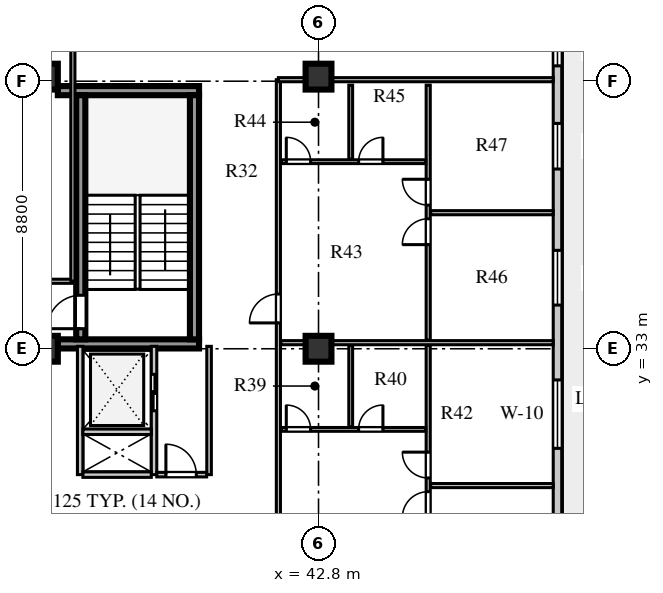
"""IFC4 building model, lengths in metres.
Left out: names, types, materials, properties, quantities, classifications, styles, units other than length and angle.
Written with IfcOpenShell. Run it as: python <this file> out.ifc"""

import sys

from ifc_helpers import new_model, si_unit, direction, frame, frame_2d, origin, origin_2d, place, context, subcontext, project, spatial, rectangle, extrude, element, fill, save


model = new_model("IFC4")
c1 = context("Model", 3, precision=1e-05, world=origin(), true_north=direction((0.0, 1.0)))
c2 = subcontext(c1, "Body", "Model", "MODEL_VIEW")
j1 = project(units=[si_unit("LENGTHUNIT", "METRE"), si_unit("PLANEANGLEUNIT", "RADIAN")], contexts=[c1])
p1 = place(None, origin())
s1 = spatial("IfcSite", under=j1, at=p1, CompositionType="ELEMENT")
p2 = place(p1, origin())
s2 = spatial("IfcBuilding", under=s1, at=p2, CompositionType="ELEMENT")
p3 = place(p2, frame((0.0, 0.0, 229.7)))
s3 = spatial("IfcBuildingStorey", under=s2, at=p3, CompositionType="ELEMENT", Elevation=229.7)
for number, where, z_axis, x_axis in (
    (1, (34.225, 33.16, 0.0), (0.0, 0.0, 1.0), (1.0, 0.0, 0.0)),
    (2, (34.225, 41.49, 0.0), (0.0, 0.0, 1.0), (1.0, 0.0, 0.0)),
):
    element("IfcWall", number, at=place(p3, frame(where, z_axis=z_axis, x_axis=x_axis)), inside=s3, PredefinedType="SHEAR", context=c2, shape_type="SweptSolid", body=[
        extrude(rectangle(XDim=4.645, YDim=0.3, at=frame_2d((2.323, 0.0))), origin(), (0.0, 0.0, 1.0), 3.66),
    ])
p4 = place(p3, frame((34.98, 33.31, 0.0), z_axis=(0.0, 0.0, 1.0), x_axis=(0.0, 1.0, 0.0)))
e3 = element("IfcWall", 3, at=p4, inside=s3, PredefinedType="SHEAR", context=c2, shape_type="SweptSolid", body=[
    extrude(rectangle(XDim=8.03, YDim=0.3, at=frame_2d((4.015, 0.0))), origin(), (0.0, 0.0, 1.0), 3.66),
])
p5 = place(p4, frame((0.35, 0.0, 0.0)))
e4 = element("IfcOpeningElement", 4, at=p5, cuts=e3, PredefinedType="OPENING", context=c2, shape_type="SweptSolid", body=[
    extrude(rectangle(XDim=1.1, YDim=2.1, at=frame_2d((0.55, 1.05))), frame((0.0, 0.16, 0.0), z_axis=(0.0, -1.0, 0.0), x_axis=(1.0, 0.0, 0.0)), (0.0, 0.0, 1.0), 0.32),
])
p6 = place(p3, frame((38.72, 33.31, 0.0), z_axis=(0.0, 0.0, 1.0), x_axis=(0.0, 1.0, 0.0)))
e5 = element("IfcWall", 5, at=p6, inside=s3, PredefinedType="SHEAR", context=c2, shape_type="SweptSolid", body=[
    extrude(rectangle(XDim=8.03, YDim=0.3, at=frame_2d((4.015, 0.0))), origin(), (0.0, 0.0, 1.0), 3.66),
])
for number, where, z_axis, x_axis in (
    (6, (33.8, 33.0, 0.0), (0.0, 0.0, 1.0), (1.0, 0.0, 0.0)),
    (7, (33.8, 41.95, 0.0), (0.0, 0.0, 1.0), (1.0, 0.0, 0.0)),
    (8, (42.8, 33.0, 0.0), (0.0, 0.0, 1.0), (1.0, 0.0, 0.0)),
    (9, (42.8, 41.95, 0.0), (0.0, 0.0, 1.0), (1.0, 0.0, 0.0)),
):
    element("IfcColumn", number, at=place(p3, frame(where, z_axis=z_axis, x_axis=x_axis)), inside=s3, PredefinedType="COLUMN", context=c2, shape_type="SweptSolid", body=[
        extrude(rectangle(XDim=0.85, YDim=0.85, at=origin_2d()), origin(), (0.0, 0.0, 1.0), 3.66),
    ])
p7 = place(p3, frame((50.66, 13.13, 0.0), z_axis=(0.0, 0.0, 1.0), x_axis=(0.0, 1.0, 0.0)))
e10 = element("IfcWall", 10, at=p7, inside=s3, PredefinedType="STANDARD", context=c2, shape_type="SweptSolid", body=[
    extrude(rectangle(XDim=30.94, YDim=0.28, at=frame_2d((15.47, 0.0))), origin(), (0.0, 0.0, 1.0), 3.66),
])
p8 = place(p7, frame((0.67, 0.0, 0.0)))
e11 = element("IfcOpeningElement", 11, at=p8, cuts=e10, PredefinedType="OPENING", context=c2, shape_type="SweptSolid", body=[
    extrude(rectangle(XDim=1.0, YDim=2.05, at=frame_2d((0.5, 1.025))), frame((0.0, 0.15, 0.0), z_axis=(0.0, -1.0, 0.0), x_axis=(1.0, 0.0, 0.0)), (0.0, 0.0, 1.0), 0.3),
])
p9 = place(p7, frame((3.683, 0.0, 0.8)))
e12 = element("IfcOpeningElement", 12, at=p9, cuts=e10, PredefinedType="OPENING", context=c2, shape_type="SweptSolid", body=[
    extrude(rectangle(XDim=1.35, YDim=1.9, at=frame_2d((0.675, 0.95))), frame((0.0, 0.15, 0.0), z_axis=(0.0, -1.0, 0.0), x_axis=(1.0, 0.0, 0.0)), (0.0, 0.0, 1.0), 0.3),
])
p10 = place(p7, frame((7.757, 0.0, 0.8)))
e13 = element("IfcOpeningElement", 13, at=p10, cuts=e10, PredefinedType="OPENING", context=c2, shape_type="SweptSolid", body=[
    extrude(rectangle(XDim=1.65, YDim=1.95, at=frame_2d((0.825, 0.975))), frame((0.0, 0.15, 0.0), z_axis=(0.0, -1.0, 0.0), x_axis=(1.0, 0.0, 0.0)), (0.0, 0.0, 1.0), 0.3),
])
p11 = place(p7, frame((12.045, 0.0, 0.8)))
e14 = element("IfcOpeningElement", 14, at=p11, cuts=e10, PredefinedType="OPENING", context=c2, shape_type="SweptSolid", body=[
    extrude(rectangle(XDim=1.95, YDim=2.0, at=frame_2d((0.975, 1.0))), frame((0.0, 0.15, 0.0), z_axis=(0.0, -1.0, 0.0), x_axis=(1.0, 0.0, 0.0)), (0.0, 0.0, 1.0), 0.3),
])
p12 = place(p7, frame((16.595, 0.0, 0.8)))
e15 = element("IfcOpeningElement", 15, at=p12, cuts=e10, PredefinedType="OPENING", context=c2, shape_type="SweptSolid", body=[
    extrude(rectangle(XDim=2.25, YDim=2.0, at=frame_2d((1.125, 1.0))), frame((0.0, 0.15, 0.0), z_axis=(0.0, -1.0, 0.0), x_axis=(1.0, 0.0, 0.0)), (0.0, 0.0, 1.0), 0.3),
])
p13 = place(p7, frame((21.307, 0.0, 0.8)))
e16 = element("IfcOpeningElement", 16, at=p13, cuts=e10, PredefinedType="OPENING", context=c2, shape_type="SweptSolid", body=[
    extrude(rectangle(XDim=1.8, YDim=2.0, at=frame_2d((0.9, 1.0))), frame((0.0, 0.15, 0.0), z_axis=(0.0, -1.0, 0.0), x_axis=(1.0, 0.0, 0.0)), (0.0, 0.0, 1.0), 0.3),
])
p14 = place(p7, frame((25.782, 0.0, 0.8)))
e17 = element("IfcOpeningElement", 17, at=p14, cuts=e10, PredefinedType="OPENING", context=c2, shape_type="SweptSolid", body=[
    extrude(rectangle(XDim=1.5, YDim=2.0, at=frame_2d((0.75, 1.0))), frame((0.0, 0.15, 0.0), z_axis=(0.0, -1.0, 0.0), x_axis=(1.0, 0.0, 0.0)), (0.0, 0.0, 1.0), 0.3),
])
p15 = place(p7, frame((29.175, 0.0, 0.8)))
e18 = element("IfcOpeningElement", 18, at=p15, cuts=e10, PredefinedType="OPENING", context=c2, shape_type="SweptSolid", body=[
    extrude(rectangle(XDim=1.2, YDim=1.75, at=frame_2d((0.6, 0.875))), frame((0.0, 0.15, 0.0), z_axis=(0.0, -1.0, 0.0), x_axis=(1.0, 0.0, 0.0)), (0.0, 0.0, 1.0), 0.3),
])
p16 = place(p3, frame((34.96, 28.86, 0.0), z_axis=(0.0, 0.0, 1.0), x_axis=(0.0, 1.0, 0.0)))
e19 = element("IfcWall", 19, at=p16, inside=s3, PredefinedType="SOLIDWALL", context=c2, shape_type="SweptSolid", body=[
    extrude(rectangle(XDim=4.22, YDim=0.18, at=frame_2d((2.11, 0.0))), origin(), (0.0, 0.0, 1.0), 3.66),
])
p17 = place(p3, frame((37.39, 28.86, 0.0), z_axis=(0.0, 0.0, 1.0), x_axis=(0.0, 1.0, 0.0)))
e20 = element("IfcWall", 20, at=p17, inside=s3, PredefinedType="SOLIDWALL", context=c2, shape_type="SweptSolid", body=[
    extrude(rectangle(XDim=4.22, YDim=0.18, at=frame_2d((2.11, 0.0))), origin(), (0.0, 0.0, 1.0), 3.66),
])
p18 = place(p17, frame((2.1, 0.0, 0.0)))
e21 = element("IfcOpeningElement", 21, at=p18, cuts=e20, PredefinedType="OPENING", context=c2, shape_type="SweptSolid", body=[
    extrude(rectangle(XDim=1.2, YDim=2.12, at=frame_2d((0.6, 1.06))), frame((0.0, 0.1, 0.0), z_axis=(0.0, -1.0, 0.0), x_axis=(1.0, 0.0, 0.0)), (0.0, 0.0, 1.0), 0.2),
])
for number, where, z_axis, x_axis in (
    (22, (35.05, 28.86, 0.0), (0.0, 0.0, 1.0), (1.0, 0.0, 0.0)),
    (23, (35.05, 30.27, 0.0), (0.0, 0.0, 1.0), (1.0, 0.0, 0.0)),
):
    element("IfcWall", number, at=place(p3, frame(where, z_axis=z_axis, x_axis=x_axis)), inside=s3, PredefinedType="SOLIDWALL", context=c2, shape_type="SweptSolid", body=[
        extrude(rectangle(XDim=2.25, YDim=0.18, at=frame_2d((1.125, 0.0))), origin(), (0.0, 0.0, 1.0), 3.66),
    ])
p19 = place(p3, frame((39.2, 28.86, 0.0), z_axis=(0.0, 0.0, 1.0), x_axis=(0.0, 1.0, 0.0)))
e24 = element("IfcWall", 24, at=p19, inside=s3, PredefinedType="PARTITIONING", context=c2, shape_type="SweptSolid", body=[
    extrude(rectangle(XDim=4.22, YDim=0.15, at=frame_2d((2.11, 0.0))), origin(), (0.0, 0.0, 1.0), 3.66),
])
p20 = place(p3, frame((37.48, 28.86, 0.0), z_axis=(0.0, 0.0, 1.0), x_axis=(1.0, 0.0, 0.0)))
e25 = element("IfcWall", 25, at=p20, inside=s3, PredefinedType="PARTITIONING", context=c2, shape_type="SweptSolid", body=[
    extrude(rectangle(XDim=1.64, YDim=0.15, at=frame_2d((0.82, 0.0))), origin(), (0.0, 0.0, 1.0), 3.66),
])
p21 = place(p20, frame((0.3, 0.0, 0.0)))
e26 = element("IfcOpeningElement", 26, at=p21, cuts=e25, PredefinedType="OPENING", context=c2, shape_type="SweptSolid", body=[
    extrude(rectangle(XDim=1.0, YDim=2.1, at=frame_2d((0.5, 1.05))), frame((0.0, 0.085, 0.0), z_axis=(0.0, -1.0, 0.0), x_axis=(1.0, 0.0, 0.0)), (0.0, 0.0, 1.0), 0.17),
])
p22 = place(p3, frame((25.22, 35.22, 0.0), z_axis=(0.0, 0.0, 1.0), x_axis=(1.0, 0.0, 0.0)))
e27 = element("IfcWall", 27, at=p22, inside=s3, PredefinedType="PARTITIONING", context=c2, shape_type="SweptSolid", body=[
    extrude(rectangle(XDim=9.5, YDim=0.135, at=frame_2d((4.75, 0.0))), origin(), (0.0, 0.0, 1.0), 3.66),
])
p23 = place(p22, frame((1.2, 0.0, 0.0)))
e28 = element("IfcOpeningElement", 28, at=p23, cuts=e27, PredefinedType="OPENING", context=c2, shape_type="SweptSolid", body=[
    extrude(rectangle(XDim=1.0, YDim=2.08, at=frame_2d((0.5, 1.04))), frame((0.0, 0.078, 0.0), z_axis=(0.0, -1.0, 0.0), x_axis=(1.0, 0.0, 0.0)), (0.0, 0.0, 1.0), 0.155),
])
p24 = place(p22, frame((6.2, 0.0, 0.0)))
e29 = element("IfcOpeningElement", 29, at=p24, cuts=e27, PredefinedType="OPENING", context=c2, shape_type="SweptSolid", body=[
    extrude(rectangle(XDim=0.9, YDim=2.08, at=frame_2d((0.45, 1.04))), frame((0.0, 0.078, 0.0), z_axis=(0.0, -1.0, 0.0), x_axis=(1.0, 0.0, 0.0)), (0.0, 0.0, 1.0), 0.155),
])
p25 = place(p3, frame((34.72, 35.22, 0.0), z_axis=(0.0, 0.0, 1.0), x_axis=(0.0, 1.0, 0.0)))
e30 = element("IfcWall", 30, at=p25, inside=s3, PredefinedType="PARTITIONING", context=c2, shape_type="SweptSolid", body=[
    extrude(rectangle(XDim=14.1, YDim=0.135, at=frame_2d((7.05, 0.0))), origin(), (0.0, 0.0, 1.0), 3.66),
])
p26 = place(p3, frame((41.48, 15.35, 0.0), z_axis=(0.0, 0.0, 1.0), x_axis=(0.0, 1.0, 0.0)))
e31 = element("IfcWall", 31, at=p26, inside=s3, PredefinedType="PARTITIONING", context=c2, shape_type="SweptSolid", body=[
    extrude(rectangle(XDim=26.5, YDim=0.135, at=frame_2d((13.25, 0.0))), origin(), (0.0, 0.0, 1.0), 3.66),
])
p27 = place(p26, frame((0.75, 0.0, 0.0)))
e32 = element("IfcOpeningElement", 32, at=p27, cuts=e31, PredefinedType="OPENING", context=c2, shape_type="SweptSolid", body=[
    extrude(rectangle(XDim=0.95, YDim=2.1, at=frame_2d((0.475, 1.05))), frame((0.0, 0.078, 0.0), z_axis=(0.0, -1.0, 0.0), x_axis=(1.0, 0.0, 0.0)), (0.0, 0.0, 1.0), 0.155),
])
p28 = place(p26, frame((9.75, 0.0, 0.0)))
e33 = element("IfcOpeningElement", 33, at=p28, cuts=e31, PredefinedType="OPENING", context=c2, shape_type="SweptSolid", body=[
    extrude(rectangle(XDim=0.95, YDim=2.1, at=frame_2d((0.475, 1.05))), frame((0.0, 0.078, 0.0), z_axis=(0.0, -1.0, 0.0), x_axis=(1.0, 0.0, 0.0)), (0.0, 0.0, 1.0), 0.155),
])
p29 = place(p26, frame((18.5, 0.0, 0.0)))
e34 = element("IfcOpeningElement", 34, at=p29, cuts=e31, PredefinedType="OPENING", context=c2, shape_type="SweptSolid", body=[
    extrude(rectangle(XDim=0.95, YDim=2.1, at=frame_2d((0.475, 1.05))), frame((0.0, 0.078, 0.0), z_axis=(0.0, -1.0, 0.0), x_axis=(1.0, 0.0, 0.0)), (0.0, 0.0, 1.0), 0.155),
])
p30 = place(p3, frame((41.48, 41.85, 0.0), z_axis=(0.0, 0.0, 1.0), x_axis=(1.0, 0.0, 0.0)))
e35 = element("IfcWall", 35, at=p30, inside=s3, PredefinedType="PARTITIONING", context=c2, shape_type="SweptSolid", body=[
    extrude(rectangle(XDim=9.04, YDim=0.135, at=frame_2d((4.52, 0.0))), origin(), (0.0, 0.0, 1.0), 3.06),
])
p31 = place(p3, frame((46.408, 23.88, 0.0), z_axis=(0.0, 0.0, 1.0), x_axis=(0.0, 1.0, 0.0)))
e36 = element("IfcWall", 36, at=p31, inside=s3, PredefinedType="PARTITIONING", context=c2, shape_type="SweptSolid", body=[
    extrude(rectangle(XDim=9.24, YDim=0.135, at=frame_2d((4.62, 0.0))), origin(), (0.0, 0.0, 1.0), 3.66),
])
p32 = place(p31, frame((3.57, 0.0, 0.0)))
e37 = element("IfcOpeningElement", 37, at=p32, cuts=e36, PredefinedType="OPENING", context=c2, shape_type="SweptSolid", body=[
    extrude(rectangle(XDim=0.85, YDim=2.08, at=frame_2d((0.425, 1.04))), frame((0.0, 0.078, 0.0), z_axis=(0.0, -1.0, 0.0), x_axis=(1.0, 0.0, 0.0)), (0.0, 0.0, 1.0), 0.155),
])
p33 = place(p31, frame((4.87, 0.0, 0.0)))
e38 = element("IfcOpeningElement", 38, at=p33, cuts=e36, PredefinedType="OPENING", context=c2, shape_type="SweptSolid", body=[
    extrude(rectangle(XDim=0.85, YDim=2.08, at=frame_2d((0.425, 1.04))), frame((0.0, 0.078, 0.0), z_axis=(0.0, -1.0, 0.0), x_axis=(1.0, 0.0, 0.0)), (0.0, 0.0, 1.0), 0.155),
])
p34 = place(p3, frame((41.58, 30.348, 0.0), z_axis=(0.0, 0.0, 1.0), x_axis=(1.0, 0.0, 0.0)))
e39 = element("IfcWall", 39, at=p34, inside=s3, PredefinedType="PLUMBINGWALL", context=c2, shape_type="SweptSolid", body=[
    extrude(rectangle(XDim=4.748, YDim=0.125, at=frame_2d((2.374, 0.0))), origin(), (0.0, 0.0, 1.0), 3.66),
])
p35 = place(p34, frame((0.16, 0.0, 0.0)))
e40 = element("IfcOpeningElement", 40, at=p35, cuts=e39, PredefinedType="OPENING", context=c2, shape_type="SweptSolid", body=[
    extrude(rectangle(XDim=0.8, YDim=2.05, at=frame_2d((0.4, 1.025))), frame((0.0, 0.073, 0.0), z_axis=(0.0, -1.0, 0.0), x_axis=(1.0, 0.0, 0.0)), (0.0, 0.0, 1.0), 0.145),
])
p36 = place(p34, frame((2.539, 0.0, 0.0)))
e41 = element("IfcOpeningElement", 41, at=p36, cuts=e39, PredefinedType="OPENING", context=c2, shape_type="SweptSolid", body=[
    extrude(rectangle(XDim=0.8, YDim=2.05, at=frame_2d((0.4, 1.025))), frame((0.0, 0.073, 0.0), z_axis=(0.0, -1.0, 0.0), x_axis=(1.0, 0.0, 0.0)), (0.0, 0.0, 1.0), 0.145),
])
p37 = place(p3, frame((43.859, 30.428, 0.0), z_axis=(0.0, 0.0, 1.0), x_axis=(0.0, 1.0, 0.0)))
e42 = element("IfcWall", 42, at=p37, inside=s3, PredefinedType="PLUMBINGWALL", context=c2, shape_type="SweptSolid", body=[
    extrude(rectangle(XDim=2.692, YDim=0.125, at=frame_2d((1.346, 0.0))), origin(), (0.0, 0.0, 1.0), 3.66),
])
p38 = place(p3, frame((46.488, 28.5, 0.0), z_axis=(0.0, 0.0, 1.0), x_axis=(1.0, 0.0, 0.0)))
e43 = element("IfcWall", 43, at=p38, inside=s3, PredefinedType="PARTITIONING", context=c2, shape_type="SweptSolid", body=[
    extrude(rectangle(XDim=4.032, YDim=0.135, at=frame_2d((2.016, 0.0))), origin(), (0.0, 0.0, 1.0), 3.66),
])
p39 = place(p3, frame((41.56, 33.2, 0.0), z_axis=(0.0, 0.0, 1.0), x_axis=(1.0, 0.0, 0.0)))
e44 = element("IfcWall", 44, at=p39, inside=s3, PredefinedType="PARTITIONING", context=c2, shape_type="SweptSolid", body=[
    extrude(rectangle(XDim=8.96, YDim=0.135, at=frame_2d((4.48, 0.0))), origin(), (0.0, 0.0, 1.0), 3.21),
])
p40 = place(p3, frame((46.408, 33.28, 0.0), z_axis=(0.0, 0.0, 1.0), x_axis=(0.0, 1.0, 0.0)))
e45 = element("IfcWall", 45, at=p40, inside=s3, PredefinedType="PARTITIONING", context=c2, shape_type="SweptSolid", body=[
    extrude(rectangle(XDim=8.39, YDim=0.135, at=frame_2d((4.195, 0.0))), origin(), (0.0, 0.0, 1.0), 3.66),
])
p41 = place(p40, frame((3.145, 0.0, 0.0)))
e46 = element("IfcOpeningElement", 46, at=p41, cuts=e45, PredefinedType="OPENING", context=c2, shape_type="SweptSolid", body=[
    extrude(rectangle(XDim=0.85, YDim=2.08, at=frame_2d((0.425, 1.04))), frame((0.0, 0.078, 0.0), z_axis=(0.0, -1.0, 0.0), x_axis=(1.0, 0.0, 0.0)), (0.0, 0.0, 1.0), 0.155),
])
p42 = place(p40, frame((4.445, 0.0, 0.0)))
e47 = element("IfcOpeningElement", 47, at=p42, cuts=e45, PredefinedType="OPENING", context=c2, shape_type="SweptSolid", body=[
    extrude(rectangle(XDim=0.85, YDim=2.08, at=frame_2d((0.425, 1.04))), frame((0.0, 0.078, 0.0), z_axis=(0.0, -1.0, 0.0), x_axis=(1.0, 0.0, 0.0)), (0.0, 0.0, 1.0), 0.155),
])
p43 = place(p3, frame((41.58, 39.153, 0.0), z_axis=(0.0, 0.0, 1.0), x_axis=(1.0, 0.0, 0.0)))
e48 = element("IfcWall", 48, at=p43, inside=s3, PredefinedType="PLUMBINGWALL", context=c2, shape_type="SweptSolid", body=[
    extrude(rectangle(XDim=4.748, YDim=0.125, at=frame_2d((2.374, 0.0))), origin(), (0.0, 0.0, 1.0), 3.66),
])
p44 = place(p43, frame((0.16, 0.0, 0.0)))
e49 = element("IfcOpeningElement", 49, at=p44, cuts=e48, PredefinedType="OPENING", context=c2, shape_type="SweptSolid", body=[
    extrude(rectangle(XDim=0.8, YDim=2.05, at=frame_2d((0.4, 1.025))), frame((0.0, 0.073, 0.0), z_axis=(0.0, -1.0, 0.0), x_axis=(1.0, 0.0, 0.0)), (0.0, 0.0, 1.0), 0.145),
])
p45 = place(p43, frame((2.539, 0.0, 0.0)))
e50 = element("IfcOpeningElement", 50, at=p45, cuts=e48, PredefinedType="OPENING", context=c2, shape_type="SweptSolid", body=[
    extrude(rectangle(XDim=0.8, YDim=2.05, at=frame_2d((0.4, 1.025))), frame((0.0, 0.073, 0.0), z_axis=(0.0, -1.0, 0.0), x_axis=(1.0, 0.0, 0.0)), (0.0, 0.0, 1.0), 0.145),
])
p46 = place(p3, frame((43.859, 39.233, 0.0), z_axis=(0.0, 0.0, 1.0), x_axis=(0.0, 1.0, 0.0)))
e51 = element("IfcWall", 51, at=p46, inside=s3, PredefinedType="PLUMBINGWALL", context=c2, shape_type="SweptSolid", body=[
    extrude(rectangle(XDim=2.437, YDim=0.125, at=frame_2d((1.219, 0.0))), origin(), (0.0, 0.0, 1.0), 3.66),
])
p47 = place(p3, frame((46.488, 37.475, 0.0), z_axis=(0.0, 0.0, 1.0), x_axis=(1.0, 0.0, 0.0)))
e52 = element("IfcWall", 52, at=p47, inside=s3, PredefinedType="PARTITIONING", context=c2, shape_type="SweptSolid", body=[
    extrude(rectangle(XDim=4.032, YDim=0.135, at=frame_2d((2.016, 0.0))), origin(), (0.0, 0.0, 1.0), 3.66),
])
p48 = place(p12, origin())
e53 = element("IfcWindow", 53, at=p48, inside=s3, PartitioningType="SINGLE_PANEL", PredefinedType="WINDOW", context=c2, shape_type="SweptSolid", body=[
    extrude(rectangle(XDim=2.25, YDim=2.0, at=frame_2d((1.125, 1.0))), frame((0.0, 0.03, 0.0), z_axis=(0.0, -1.0, 0.0), x_axis=(1.0, 0.0, 0.0)), (0.0, 0.0, 1.0), 0.06),
])
fill(e15, e53)
p49 = place(p13, origin())
e54 = element("IfcWindow", 54, at=p49, inside=s3, PartitioningType="SINGLE_PANEL", PredefinedType="WINDOW", context=c2, shape_type="SweptSolid", body=[
    extrude(rectangle(XDim=1.8, YDim=2.0, at=frame_2d((0.9, 1.0))), frame((0.0, 0.03, 0.0), z_axis=(0.0, -1.0, 0.0), x_axis=(1.0, 0.0, 0.0)), (0.0, 0.0, 1.0), 0.06),
])
fill(e16, e54)
p50 = place(p14, origin())
e55 = element("IfcWindow", 55, at=p50, inside=s3, PartitioningType="SINGLE_PANEL", PredefinedType="WINDOW", context=c2, shape_type="SweptSolid", body=[
    extrude(rectangle(XDim=1.5, YDim=2.0, at=frame_2d((0.75, 1.0))), frame((0.0, 0.03, 0.0), z_axis=(0.0, -1.0, 0.0), x_axis=(1.0, 0.0, 0.0)), (0.0, 0.0, 1.0), 0.06),
])
fill(e17, e55)
p51 = place(p15, origin())
e56 = element("IfcWindow", 56, at=p51, inside=s3, PartitioningType="SINGLE_PANEL", PredefinedType="WINDOW", context=c2, shape_type="SweptSolid", body=[
    extrude(rectangle(XDim=1.2, YDim=1.75, at=frame_2d((0.6, 0.875))), frame((0.0, 0.03, 0.0), z_axis=(0.0, -1.0, 0.0), x_axis=(1.0, 0.0, 0.0)), (0.0, 0.0, 1.0), 0.06),
])
fill(e18, e56)
p52 = place(p5, origin())
e57 = element("IfcDoor", 57, at=p52, inside=s3, OperationType="SINGLE_SWING_LEFT", PredefinedType="DOOR", context=c2, shape_type="SweptSolid", body=[
    extrude(rectangle(XDim=1.1, YDim=2.1, at=frame_2d((0.55, 1.05))), frame((0.0, 0.025, 0.0), z_axis=(0.0, -1.0, 0.0), x_axis=(1.0, 0.0, 0.0)), (0.0, 0.0, 1.0), 0.05),
])
fill(e4, e57)
p53 = place(p18, frame((1.2, 0.0, 0.0), z_axis=(0.0, 0.0, 1.0), x_axis=(-1.0, 0.0, 0.0)))
e58 = element("IfcDoor", 58, at=p53, inside=s3, OperationType="DOUBLE_DOOR_SLIDING", PredefinedType="DOOR", context=c2, shape_type="SweptSolid", body=[
    extrude(rectangle(XDim=1.2, YDim=2.12, at=frame_2d((0.6, 1.06))), frame((0.0, 0.025, 0.0), z_axis=(0.0, -1.0, 0.0), x_axis=(1.0, 0.0, 0.0)), (0.0, 0.0, 1.0), 0.05),
])
fill(e21, e58)
p54 = place(p21, origin())
e59 = element("IfcDoor", 59, at=p54, inside=s3, OperationType="SINGLE_SWING_LEFT", PredefinedType="DOOR", context=c2, shape_type="SweptSolid", body=[
    extrude(rectangle(XDim=1.0, YDim=2.1, at=frame_2d((0.5, 1.05))), frame((0.0, 0.025, 0.0), z_axis=(0.0, -1.0, 0.0), x_axis=(1.0, 0.0, 0.0)), (0.0, 0.0, 1.0), 0.05),
])
fill(e26, e59)
p55 = place(p35, origin())
e60 = element("IfcDoor", 60, at=p55, inside=s3, OperationType="SINGLE_SWING_LEFT", PredefinedType="DOOR", context=c2, shape_type="SweptSolid", body=[
    extrude(rectangle(XDim=0.8, YDim=2.05, at=frame_2d((0.4, 1.025))), frame((0.0, 0.025, 0.0), z_axis=(0.0, -1.0, 0.0), x_axis=(1.0, 0.0, 0.0)), (0.0, 0.0, 1.0), 0.05),
])
fill(e40, e60)
p56 = place(p36, origin())
e61 = element("IfcDoor", 61, at=p56, inside=s3, OperationType="SINGLE_SWING_RIGHT", PredefinedType="DOOR", context=c2, shape_type="SweptSolid", body=[
    extrude(rectangle(XDim=0.8, YDim=2.05, at=frame_2d((0.4, 1.025))), frame((0.0, 0.025, 0.0), z_axis=(0.0, -1.0, 0.0), x_axis=(1.0, 0.0, 0.0)), (0.0, 0.0, 1.0), 0.05),
])
fill(e41, e61)
p57 = place(p32, origin())
e62 = element("IfcDoor", 62, at=p57, inside=s3, OperationType="SINGLE_SWING_LEFT", PredefinedType="DOOR", context=c2, shape_type="SweptSolid", body=[
    extrude(rectangle(XDim=0.85, YDim=2.08, at=frame_2d((0.425, 1.04))), frame((0.0, 0.025, 0.0), z_axis=(0.0, -1.0, 0.0), x_axis=(1.0, 0.0, 0.0)), (0.0, 0.0, 1.0), 0.05),
])
fill(e37, e62)
p58 = place(p33, origin())
e63 = element("IfcDoor", 63, at=p58, inside=s3, OperationType="SINGLE_SWING_RIGHT", PredefinedType="DOOR", context=c2, shape_type="SweptSolid", body=[
    extrude(rectangle(XDim=0.85, YDim=2.08, at=frame_2d((0.425, 1.04))), frame((0.0, 0.025, 0.0), z_axis=(0.0, -1.0, 0.0), x_axis=(1.0, 0.0, 0.0)), (0.0, 0.0, 1.0), 0.05),
])
fill(e38, e63)
p59 = place(p44, origin())
e64 = element("IfcDoor", 64, at=p59, inside=s3, OperationType="SINGLE_SWING_LEFT", PredefinedType="DOOR", context=c2, shape_type="SweptSolid", body=[
    extrude(rectangle(XDim=0.8, YDim=2.05, at=frame_2d((0.4, 1.025))), frame((0.0, 0.025, 0.0), z_axis=(0.0, -1.0, 0.0), x_axis=(1.0, 0.0, 0.0)), (0.0, 0.0, 1.0), 0.05),
])
fill(e49, e64)
p60 = place(p45, origin())
e65 = element("IfcDoor", 65, at=p60, inside=s3, OperationType="SINGLE_SWING_RIGHT", PredefinedType="DOOR", context=c2, shape_type="SweptSolid", body=[
    extrude(rectangle(XDim=0.8, YDim=2.05, at=frame_2d((0.4, 1.025))), frame((0.0, 0.025, 0.0), z_axis=(0.0, -1.0, 0.0), x_axis=(1.0, 0.0, 0.0)), (0.0, 0.0, 1.0), 0.05),
])
fill(e50, e65)
p61 = place(p41, origin())
e66 = element("IfcDoor", 66, at=p61, inside=s3, OperationType="SINGLE_SWING_LEFT", PredefinedType="DOOR", context=c2, shape_type="SweptSolid", body=[
    extrude(rectangle(XDim=0.85, YDim=2.08, at=frame_2d((0.425, 1.04))), frame((0.0, 0.025, 0.0), z_axis=(0.0, -1.0, 0.0), x_axis=(1.0, 0.0, 0.0)), (0.0, 0.0, 1.0), 0.05),
])
fill(e46, e66)
p62 = place(p42, origin())
e67 = element("IfcDoor", 67, at=p62, inside=s3, OperationType="SINGLE_SWING_RIGHT", PredefinedType="DOOR", context=c2, shape_type="SweptSolid", body=[
    extrude(rectangle(XDim=0.85, YDim=2.08, at=frame_2d((0.425, 1.04))), frame((0.0, 0.025, 0.0), z_axis=(0.0, -1.0, 0.0), x_axis=(1.0, 0.0, 0.0)), (0.0, 0.0, 1.0), 0.05),
])
fill(e47, e67)
p63 = place(p29, origin())
e68 = element("IfcDoor", 68, at=p63, inside=s3, OperationType="SINGLE_SWING_LEFT", PredefinedType="DOOR", context=c2, shape_type="SweptSolid", body=[
    extrude(rectangle(XDim=0.95, YDim=2.1, at=frame_2d((0.475, 1.05))), frame((0.0, 0.025, 0.0), z_axis=(0.0, -1.0, 0.0), x_axis=(1.0, 0.0, 0.0)), (0.0, 0.0, 1.0), 0.05),
])
fill(e34, e68)
save(model, sys.argv[1])
